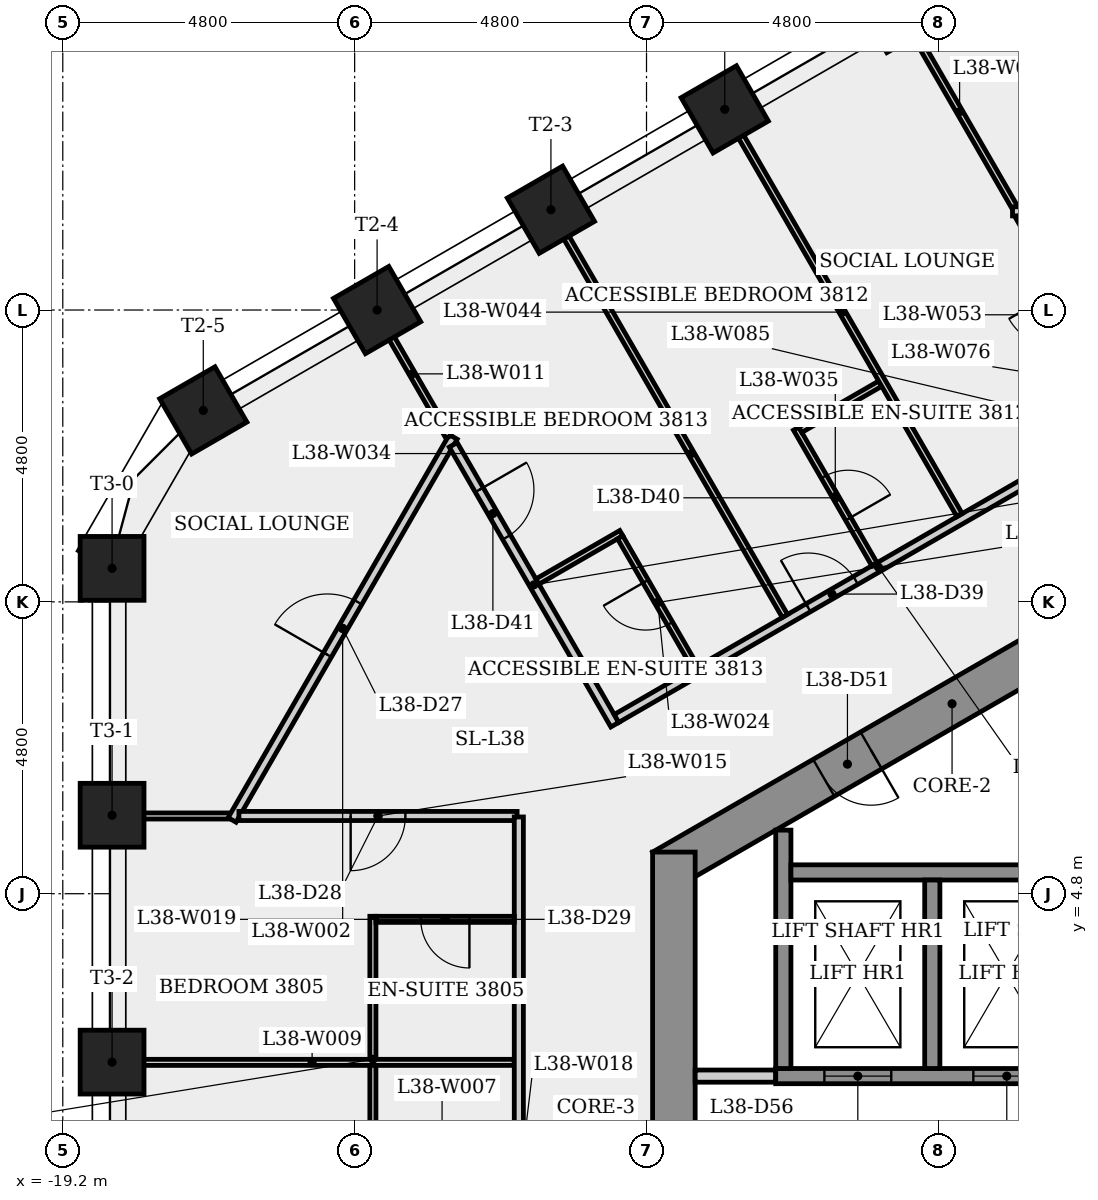
"""IFC4 building model, lengths in metres.
Left out: names, types, materials, properties, quantities, classifications, styles, units other than length and angle.
Written with IfcOpenShell. Run it as: python <this file> out.ifc"""

import sys

from ifc_helpers import new_model, si_unit, direction, frame, frame_2d, origin, origin_2d, place, context, subcontext, project, spatial, rectangle, extrude, element, fill, save


model = new_model("IFC4")
c1 = context("Model", 3, precision=1e-05, world=origin(), true_north=direction((0.0, 1.0)))
c2 = subcontext(c1, "Body", "Model", "MODEL_VIEW")
j1 = project(units=[si_unit("LENGTHUNIT", "METRE"), si_unit("PLANEANGLEUNIT", "RADIAN")], contexts=[c1])
p1 = place(None, origin())
s1 = spatial("IfcSite", under=j1, at=p1, CompositionType="ELEMENT")
p2 = place(p1, origin())
s2 = spatial("IfcBuilding", under=s1, at=p2, CompositionType="ELEMENT")
p3 = place(p2, frame((0.0, 0.0, 143.9)))
s3 = spatial("IfcBuildingStorey", under=s2, at=p3, CompositionType="ELEMENT", Elevation=143.9)
p4 = place(p3, frame((0.175, 10.667, 0.0), z_axis=(0.0, 0.0, 1.0), x_axis=(-0.866023993627, -0.500002442456, 0.0)))
e1 = element("IfcWall", 1, at=p4, inside=s3, PredefinedType="SHEAR", context=c2, shape_type="SweptSolid", body=[
    extrude(rectangle(XDim=10.97, YDim=0.7, at=frame_2d((5.485, 0.0))), origin(), (0.0, 0.0, 1.0), 4.0),
])
p5 = place(p4, frame((7.021, 0.0, 0.0)))
e2 = element("IfcOpeningElement", 2, at=p5, cuts=e1, PredefinedType="OPENING", context=c2, shape_type="SweptSolid", body=[
    extrude(rectangle(XDim=0.9, YDim=2.1, at=frame_2d((0.45, 1.05))), frame((0.0, 0.36, 0.0), z_axis=(0.0, -1.0, 0.0), x_axis=(1.0, 0.0, 0.0)), (0.0, 0.0, 1.0), 0.72),
])
p6 = place(p3, frame((-9.15, 5.485, 0.0), z_axis=(0.0, 0.0, 1.0), x_axis=(0.0, -1.0, 0.0)))
e3 = element("IfcWall", 3, at=p6, inside=s3, PredefinedType="SHEAR", context=c2, shape_type="SweptSolid", body=[
    extrude(rectangle(XDim=10.97, YDim=0.7, at=frame_2d((5.485, 0.0))), origin(), (0.0, 0.0, 1.0), 4.0),
])
p7 = place(p6, frame((4.685, 0.0, 0.0)))
e4 = element("IfcOpeningElement", 4, at=p7, cuts=e3, PredefinedType="OPENING", context=c2, shape_type="SweptSolid", body=[
    extrude(rectangle(XDim=1.6, YDim=2.1, at=frame_2d((0.8, 1.05))), frame((0.0, 0.36, 0.0), z_axis=(0.0, -1.0, 0.0), x_axis=(1.0, 0.0, 0.0)), (0.0, 0.0, 1.0), 0.72),
])
for number, where, z_axis, x_axis in (
    (5, (-5.455, 19.351, 0.0), (0.0, 0.0, 1.0), (-0.5, 0.866, 0.0)),
    (6, (-8.313, 17.7, 0.0), (0.0, 0.0, 1.0), (-0.5, 0.866, 0.0)),
    (7, (-11.172, 16.05, 0.0), (0.0, 0.0, 1.0), (-0.5, 0.866, 0.0)),
    (8, (-14.031, 14.399, 0.0), (0.0, 0.0, 1.0), (-0.5, 0.866, 0.0)),
    (9, (-16.889, 12.749, 0.0), (0.0, 0.0, 1.0), (-0.5, 0.866, 0.0)),
    (10, (-18.389, 10.151, 0.0), (0.0, 0.0, 1.0), (-1.0, 0.0, 0.0)),
    (11, (-18.389, 6.091, 0.0), (0.0, 0.0, 1.0), (-1.0, 0.0, 0.0)),
    (12, (-18.389, 2.03, 0.0), (0.0, 0.0, 1.0), (-1.0, 0.0, 0.0)),
):
    element("IfcColumn", number, at=place(p3, frame(where, z_axis=z_axis, x_axis=x_axis)), inside=s3, PredefinedType="COLUMN", context=c2, shape_type="SweptSolid", body=[
        extrude(rectangle(XDim=1.05, YDim=1.05, at=origin_2d()), origin(), (0.0, 0.0, 1.0), 4.0),
    ])
p8 = place(p3, frame((-16.453, 6.078, 0.0), z_axis=(0.0, 0.0, 1.0), x_axis=(-1.0, 0.0, 0.0)))
e13 = element("IfcWall", 13, at=p8, inside=s3, PredefinedType="PARTITIONING", context=c2, shape_type="SweptSolid", body=[
    extrude(rectangle(XDim=1.971, YDim=0.1, at=frame_2d((0.986, 0.0))), origin(), (0.0, 0.0, 1.0), 3.6),
])
p9 = place(p3, frame((-16.416, 6.013, 0.0), z_axis=(0.0, 0.0, 1.0), x_axis=(0.50001977908, 0.866013984026, 0.0)))
e14 = element("IfcWall", 14, at=p9, inside=s3, PredefinedType="PARTITIONING", context=c2, shape_type="SweptSolid", body=[
    extrude(rectangle(XDim=7.274, YDim=0.15, at=frame_2d((3.637, 0.0))), origin(), (0.0, 0.0, 1.0), 3.6),
])
p10 = place(p9, frame((3.137, 0.0, 0.0)))
e15 = element("IfcOpeningElement", 15, at=p10, cuts=e14, PredefinedType="OPENING", context=c2, shape_type="SweptSolid", body=[
    extrude(rectangle(XDim=1.0, YDim=2.1, at=frame_2d((0.5, 1.05))), frame((0.0, 0.085, 0.0), z_axis=(0.0, -1.0, 0.0), x_axis=(1.0, 0.0, 0.0)), (0.0, 0.0, 1.0), 0.17),
])
p11 = place(p3, frame((-14.1, -0.276, 0.0), z_axis=(0.0, 0.0, 1.0), x_axis=(0.0, 1.0, 0.0)))
e16 = element("IfcWall", 16, at=p11, inside=s3, PredefinedType="PARTITIONING", context=c2, shape_type="SweptSolid", body=[
    extrude(rectangle(XDim=4.705, YDim=0.1, at=frame_2d((2.352, 0.0))), origin(), (0.0, 0.0, 1.0), 3.6),
])
p12 = place(p3, frame((-18.424, 2.026, 0.0), z_axis=(0.0, 0.0, 1.0), x_axis=(1.0, 0.0, 0.0)))
e17 = element("IfcWall", 17, at=p12, inside=s3, PredefinedType="PARTITIONING", context=c2, shape_type="SweptSolid", body=[
    extrude(rectangle(XDim=6.649, YDim=0.1, at=frame_2d((3.325, 0.0))), origin(), (0.0, 0.0, 1.0), 3.6),
])
p13 = place(p3, frame((-14.052, 14.387, 0.0), z_axis=(0.0, 0.0, 1.0), x_axis=(0.499975343382, -0.866039638822, 0.0)))
e18 = element("IfcWall", 18, at=p13, inside=s3, PredefinedType="PARTITIONING", context=c2, shape_type="SweptSolid", body=[
    extrude(rectangle(XDim=2.396, YDim=0.1, at=frame_2d((1.198, 0.0))), origin(), (0.0, 0.0, 1.0), 3.6),
])
p14 = place(p3, frame((-12.779, 12.183, 0.0), z_axis=(0.0, 0.0, 1.0), x_axis=(0.500007419992, -0.866021119808, 0.0)))
e19 = element("IfcWall", 19, at=p14, inside=s3, PredefinedType="PARTITIONING", context=c2, shape_type="SweptSolid", body=[
    extrude(rectangle(XDim=5.315, YDim=0.15, at=frame_2d((2.657, 0.0))), origin(), (0.0, 0.0, 1.0), 3.6),
])
p15 = place(p14, frame((0.855, 0.0, 0.0)))
e20 = element("IfcOpeningElement", 20, at=p15, cuts=e19, PredefinedType="OPENING", context=c2, shape_type="SweptSolid", body=[
    extrude(rectangle(XDim=0.9, YDim=2.1, at=frame_2d((0.45, 1.05))), frame((0.0, 0.085, 0.0), z_axis=(0.0, -1.0, 0.0), x_axis=(1.0, 0.0, 0.0)), (0.0, 0.0, 1.0), 0.17),
])
p16 = place(p3, frame((-11.728, 6.078, 0.0), z_axis=(0.0, 0.0, 1.0), x_axis=(-1.0, 0.0, 0.0)))
e21 = element("IfcWall", 21, at=p16, inside=s3, PredefinedType="PARTITIONING", context=c2, shape_type="SweptSolid", body=[
    extrude(rectangle(XDim=4.575, YDim=0.15, at=frame_2d((2.288, 0.0))), origin(), (0.0, 0.0, 1.0), 3.6),
])
p17 = place(p16, frame((1.838, 0.0, 0.0)))
e22 = element("IfcOpeningElement", 22, at=p17, cuts=e21, PredefinedType="OPENING", context=c2, shape_type="SweptSolid", body=[
    extrude(rectangle(XDim=0.9, YDim=2.1, at=frame_2d((0.45, 1.05))), frame((0.0, 0.085, 0.0), z_axis=(0.0, -1.0, 0.0), x_axis=(1.0, 0.0, 0.0)), (0.0, 0.0, 1.0), 0.17),
])
p18 = place(p3, frame((-11.7, 6.062, 0.0), z_axis=(0.0, 0.0, 1.0), x_axis=(0.0, -1.0, 0.0)))
e23 = element("IfcWall", 23, at=p18, inside=s3, PredefinedType="PARTITIONING", context=c2, shape_type="SweptSolid", body=[
    extrude(rectangle(XDim=12.125, YDim=0.15, at=frame_2d((6.062, 0.0))), origin(), (0.0, 0.0, 1.0), 3.6),
])
p19 = place(p18, frame((6.788, 0.0, 0.0)))
e24 = element("IfcOpeningElement", 24, at=p19, cuts=e23, PredefinedType="OPENING", context=c2, shape_type="SweptSolid", body=[
    extrude(rectangle(XDim=0.9, YDim=2.1, at=frame_2d((0.45, 1.05))), frame((0.0, 0.085, 0.0), z_axis=(0.0, -1.0, 0.0), x_axis=(1.0, 0.0, 0.0)), (0.0, 0.0, 1.0), 0.17),
])
p20 = place(p3, frame((-11.775, 4.378, 0.0), z_axis=(0.0, 0.0, 1.0), x_axis=(-1.0, 0.0, 0.0)))
e25 = element("IfcWall", 25, at=p20, inside=s3, PredefinedType="PARTITIONING", context=c2, shape_type="SweptSolid", body=[
    extrude(rectangle(XDim=2.275, YDim=0.1, at=frame_2d((1.138, 0.0))), origin(), (0.0, 0.0, 1.0), 3.6),
])
p21 = place(p20, frame((0.738, 0.0, 0.0)))
e26 = element("IfcOpeningElement", 26, at=p21, cuts=e25, PredefinedType="OPENING", context=c2, shape_type="SweptSolid", body=[
    extrude(rectangle(XDim=0.8, YDim=2.1, at=frame_2d((0.4, 1.05))), frame((0.0, 0.06, 0.0), z_axis=(0.0, -1.0, 0.0), x_axis=(1.0, 0.0, 0.0)), (0.0, 0.0, 1.0), 0.12),
])
p22 = place(p3, frame((-10.094, 7.682, 0.0), z_axis=(0.0, 0.0, 1.0), x_axis=(0.866024204941, 0.500002076452, 0.0)))
e27 = element("IfcWall", 27, at=p22, inside=s3, PredefinedType="PARTITIONING", context=c2, shape_type="SweptSolid", body=[
    extrude(rectangle(XDim=9.951, YDim=0.15, at=frame_2d((4.976, 0.0))), origin(), (0.0, 0.0, 1.0), 3.6),
])
p23 = place(p22, frame((3.642, 0.0, 0.0)))
e28 = element("IfcOpeningElement", 28, at=p23, cuts=e27, PredefinedType="OPENING", context=c2, shape_type="SweptSolid", body=[
    extrude(rectangle(XDim=0.9, YDim=2.1, at=frame_2d((0.45, 1.05))), frame((0.0, 0.085, 0.0), z_axis=(0.0, -1.0, 0.0), x_axis=(1.0, 0.0, 0.0)), (0.0, 0.0, 1.0), 0.17),
])
p24 = place(p3, frame((-10.015, 10.73, 0.0), z_axis=(0.0, 0.0, 1.0), x_axis=(-0.866017059223, -0.500014452926, 0.0)))
e29 = element("IfcWall", 29, at=p24, inside=s3, PredefinedType="PARTITIONING", context=c2, shape_type="SweptSolid", body=[
    extrude(rectangle(XDim=1.592, YDim=0.1, at=frame_2d((0.796, 0.0))), origin(), (0.0, 0.0, 1.0), 3.6),
])
p25 = place(p3, frame((-8.8, 1.8, 0.0), z_axis=(0.0, 0.0, 1.0), x_axis=(1.0, 0.0, 0.0)))
e30 = element("IfcWall", 30, at=p25, inside=s3, PredefinedType="PARTITIONING", context=c2, shape_type="SweptSolid", body=[
    extrude(rectangle(XDim=1.325, YDim=0.2, at=frame_2d((0.663, 0.0))), origin(), (0.0, 0.0, 1.0), 3.6),
])
p26 = place(p3, frame((-8.796, 8.518, 0.0), z_axis=(0.0, 0.0, 1.0), x_axis=(-0.500032699561, 0.866006523861, 0.0)))
e31 = element("IfcWall", 31, at=p26, inside=s3, PredefinedType="PARTITIONING", context=c2, shape_type="SweptSolid", body=[
    extrude(rectangle(XDim=2.475, YDim=0.1, at=frame_2d((1.237, 0.0))), origin(), (0.0, 0.0, 1.0), 3.6),
])
p27 = place(p26, frame((0.837, 0.0, 0.0)))
e32 = element("IfcOpeningElement", 32, at=p27, cuts=e31, PredefinedType="OPENING", context=c2, shape_type="SweptSolid", body=[
    extrude(rectangle(XDim=0.8, YDim=2.1, at=frame_2d((0.4, 1.05))), frame((0.0, 0.06, 0.0), z_axis=(0.0, -1.0, 0.0), x_axis=(1.0, 0.0, 0.0)), (0.0, 0.0, 1.0), 0.12),
])
p28 = place(p3, frame((-7.475, 1.8, 0.0), z_axis=(0.0, 0.0, 1.0), x_axis=(1.0, 0.0, 0.0)))
e33 = element("IfcWall", 33, at=p28, inside=s3, PredefinedType="SHEAR", context=c2, shape_type="SweptSolid", body=[
    extrude(rectangle(XDim=14.95, YDim=0.25, at=frame_2d((7.475, 0.0))), origin(), (0.0, 0.0, 1.0), 3.6),
])
p29 = place(p28, frame((0.8, 0.0, 0.0)))
e34 = element("IfcOpeningElement", 34, at=p29, cuts=e33, PredefinedType="OPENING", context=c2, shape_type="SweptSolid", body=[
    extrude(rectangle(XDim=1.1, YDim=2.1, at=frame_2d((0.55, 1.05))), frame((0.0, 0.135, 0.0), z_axis=(0.0, -1.0, 0.0), x_axis=(1.0, 0.0, 0.0)), (0.0, 0.0, 1.0), 0.27),
])
p30 = place(p28, frame((3.25, 0.0, 0.0)))
e35 = element("IfcOpeningElement", 35, at=p30, cuts=e33, PredefinedType="OPENING", context=c2, shape_type="SweptSolid", body=[
    extrude(rectangle(XDim=1.1, YDim=2.1, at=frame_2d((0.55, 1.05))), frame((0.0, 0.135, 0.0), z_axis=(0.0, -1.0, 0.0), x_axis=(1.0, 0.0, 0.0)), (0.0, 0.0, 1.0), 0.27),
])
p31 = place(p28, frame((5.7, 0.0, 0.0)))
e36 = element("IfcOpeningElement", 36, at=p31, cuts=e33, PredefinedType="OPENING", context=c2, shape_type="SweptSolid", body=[
    extrude(rectangle(XDim=1.1, YDim=2.1, at=frame_2d((0.55, 1.05))), frame((0.0, 0.135, 0.0), z_axis=(0.0, -1.0, 0.0), x_axis=(1.0, 0.0, 0.0)), (0.0, 0.0, 1.0), 0.27),
])
p32 = place(p28, frame((8.15, 0.0, 0.0)))
e37 = element("IfcOpeningElement", 37, at=p32, cuts=e33, PredefinedType="OPENING", context=c2, shape_type="SweptSolid", body=[
    extrude(rectangle(XDim=1.1, YDim=2.1, at=frame_2d((0.55, 1.05))), frame((0.0, 0.135, 0.0), z_axis=(0.0, -1.0, 0.0), x_axis=(1.0, 0.0, 0.0)), (0.0, 0.0, 1.0), 0.27),
])
p33 = place(p28, frame((10.6, 0.0, 0.0)))
e38 = element("IfcOpeningElement", 38, at=p33, cuts=e33, PredefinedType="OPENING", context=c2, shape_type="SweptSolid", body=[
    extrude(rectangle(XDim=1.1, YDim=2.1, at=frame_2d((0.55, 1.05))), frame((0.0, 0.135, 0.0), z_axis=(0.0, -1.0, 0.0), x_axis=(1.0, 0.0, 0.0)), (0.0, 0.0, 1.0), 0.27),
])
p34 = place(p28, frame((13.05, 0.0, 0.0)))
e39 = element("IfcOpeningElement", 39, at=p34, cuts=e33, PredefinedType="OPENING", context=c2, shape_type="SweptSolid", body=[
    extrude(rectangle(XDim=1.1, YDim=2.1, at=frame_2d((0.55, 1.05))), frame((0.0, 0.135, 0.0), z_axis=(0.0, -1.0, 0.0), x_axis=(1.0, 0.0, 0.0)), (0.0, 0.0, 1.0), 0.27),
])
p35 = place(p3, frame((-7.35, 1.925, 0.0), z_axis=(0.0, 0.0, 1.0), x_axis=(0.0, 1.0, 0.0)))
e40 = element("IfcWall", 40, at=p35, inside=s3, PredefinedType="SHEAR", context=c2, shape_type="SweptSolid", body=[
    extrude(rectangle(XDim=3.921, YDim=0.25, at=frame_2d((1.96, 0.0))), origin(), (0.0, 0.0, 1.0), 3.6),
])
p36 = place(p3, frame((-7.225, 5.15, 0.0), z_axis=(0.0, 0.0, 1.0), x_axis=(1.0, 0.0, 0.0)))
e41 = element("IfcWall", 41, at=p36, inside=s3, PredefinedType="SHEAR", context=c2, shape_type="SweptSolid", body=[
    extrude(rectangle(XDim=14.7, YDim=0.25, at=frame_2d((7.35, 0.0))), origin(), (0.0, 0.0, 1.0), 3.6),
])
p37 = place(p3, frame((-7.324, 9.368, 0.0), z_axis=(0.0, 0.0, 1.0), x_axis=(-0.500021201058, 0.866013163002, 0.0)))
e42 = element("IfcWall", 42, at=p37, inside=s3, PredefinedType="PARTITIONING", context=c2, shape_type="SweptSolid", body=[
    extrude(rectangle(XDim=7.711, YDim=0.1, at=frame_2d((3.855, 0.0))), origin(), (0.0, 0.0, 1.0), 3.6),
])
p38 = place(p3, frame((-7.139, 12.448, 0.0), z_axis=(0.0, 0.0, 1.0), x_axis=(0.500034319456, -0.866005588531, 0.0)))
e43 = element("IfcWall", 43, at=p38, inside=s3, PredefinedType="PARTITIONING", context=c2, shape_type="SweptSolid", body=[
    extrude(rectangle(XDim=2.575, YDim=0.1, at=frame_2d((1.288, 0.0))), origin(), (0.0, 0.0, 1.0), 3.6),
])
p39 = place(p38, frame((0.913, 0.0, 0.0)))
e44 = element("IfcOpeningElement", 44, at=p39, cuts=e43, PredefinedType="OPENING", context=c2, shape_type="SweptSolid", body=[
    extrude(rectangle(XDim=0.8, YDim=2.1, at=frame_2d((0.4, 1.05))), frame((0.0, 0.06, 0.0), z_axis=(0.0, -1.0, 0.0), x_axis=(1.0, 0.0, 0.0)), (0.0, 0.0, 1.0), 0.12),
])
p40 = place(p3, frame((-5.757, 13.188, 0.0), z_axis=(0.0, 0.0, 1.0), x_axis=(-0.866006015803, -0.500033579465, 0.0)))
e45 = element("IfcWall", 45, at=p40, inside=s3, PredefinedType="PARTITIONING", context=c2, shape_type="SweptSolid", body=[
    extrude(rectangle(XDim=1.517, YDim=0.1, at=frame_2d((0.759, 0.0))), origin(), (0.0, 0.0, 1.0), 3.6),
])
p41 = place(p3, frame((-5.359, 19.233, 0.0), z_axis=(0.0, 0.0, 1.0), x_axis=(0.499978511878, -0.866037809602, 0.0)))
e46 = element("IfcWall", 46, at=p41, inside=s3, PredefinedType="PARTITIONING", context=c2, shape_type="SweptSolid", body=[
    extrude(rectangle(XDim=3.632, YDim=0.1, at=frame_2d((1.816, 0.0))), origin(), (0.0, 0.0, 1.0), 3.6),
])
p42 = place(p3, frame((-4.9, 5.025, 0.0), z_axis=(0.0, 0.0, 1.0), x_axis=(0.0, -1.0, 0.0)))
e47 = element("IfcWall", 47, at=p42, inside=s3, PredefinedType="SHEAR", context=c2, shape_type="SweptSolid", body=[
    extrude(rectangle(XDim=3.1, YDim=0.25, at=frame_2d((1.55, 0.0))), origin(), (0.0, 0.0, 1.0), 4.0),
])
p43 = place(p3, frame((-4.451, 11.027, 0.0), z_axis=(0.0, 0.0, 1.0), x_axis=(-0.499983743644, 0.866034789193, 0.0)))
e48 = element("IfcWall", 48, at=p43, inside=s3, PredefinedType="PARTITIONING", context=c2, shape_type="SweptSolid", body=[
    extrude(rectangle(XDim=7.711, YDim=0.1, at=frame_2d((3.855, 0.0))), origin(), (0.0, 0.0, 1.0), 3.6),
])
p44 = place(p3, frame((-4.951, 26.117, 0.0), z_axis=(0.0, 0.0, 1.0), x_axis=(0.866023342268, -0.500003570635, 0.0)))
e49 = element("IfcWall", 49, at=p44, inside=s3, PredefinedType="PARTITIONING", context=c2, shape_type="SweptSolid", body=[
    extrude(rectangle(XDim=25.385, YDim=0.1, at=frame_2d((12.692, 0.0))), origin(), (0.0, 0.0, 1.0), 3.6),
])
p45 = place(p3, frame((-3.581, 16.023, 0.0), z_axis=(0.0, 0.0, 1.0), x_axis=(1.0, 0.0, 0.0)))
e50 = element("IfcWall", 50, at=p45, inside=s3, PredefinedType="PARTITIONING", context=c2, shape_type="SweptSolid", body=[
    extrude(rectangle(XDim=4.393, YDim=0.15, at=frame_2d((2.196, 0.0))), origin(), (0.0, 0.0, 1.0), 3.6),
])
p46 = place(p3, frame((-1.579, 12.685, 0.0), z_axis=(0.0, 0.0, 1.0), x_axis=(-0.500002049001, 0.86602422079, 0.0)))
e51 = element("IfcWall", 51, at=p46, inside=s3, PredefinedType="PARTITIONING", context=c2, shape_type="SweptSolid", body=[
    extrude(rectangle(XDim=3.779, YDim=0.15, at=frame_2d((1.89, 0.0))), origin(), (0.0, 0.0, 1.0), 3.6),
])
p47 = place(p46, frame((1.39, 0.0, 0.0)))
e52 = element("IfcOpeningElement", 52, at=p47, cuts=e51, PredefinedType="OPENING", context=c2, shape_type="SweptSolid", body=[
    extrude(rectangle(XDim=1.0, YDim=2.1, at=frame_2d((0.5, 1.05))), frame((0.0, 0.085, 0.0), z_axis=(0.0, -1.0, 0.0), x_axis=(1.0, 0.0, 0.0)), (0.0, 0.0, 1.0), 0.17),
])
p48 = place(p29, origin())
e53 = element("IfcDoor", 53, at=p48, inside=s3, OperationType="SLIDING_TO_LEFT", PredefinedType="DOOR", context=c2, shape_type="SweptSolid", body=[
    extrude(rectangle(XDim=1.1, YDim=2.1, at=frame_2d((0.55, 1.05))), frame((0.0, 0.025, 0.0), z_axis=(0.0, -1.0, 0.0), x_axis=(1.0, 0.0, 0.0)), (0.0, 0.0, 1.0), 0.05),
])
fill(e34, e53)
p49 = place(p30, origin())
e54 = element("IfcDoor", 54, at=p49, inside=s3, OperationType="SLIDING_TO_LEFT", PredefinedType="DOOR", context=c2, shape_type="SweptSolid", body=[
    extrude(rectangle(XDim=1.1, YDim=2.1, at=frame_2d((0.55, 1.05))), frame((0.0, 0.025, 0.0), z_axis=(0.0, -1.0, 0.0), x_axis=(1.0, 0.0, 0.0)), (0.0, 0.0, 1.0), 0.05),
])
fill(e35, e54)
p50 = place(p10, origin())
e55 = element("IfcDoor", 55, at=p50, inside=s3, OperationType="SINGLE_SWING_LEFT", PredefinedType="DOOR", context=c2, shape_type="SweptSolid", body=[
    extrude(rectangle(XDim=1.0, YDim=2.1, at=frame_2d((0.5, 1.05))), frame((0.0, 0.025, 0.0), z_axis=(0.0, -1.0, 0.0), x_axis=(1.0, 0.0, 0.0)), (0.0, 0.0, 1.0), 0.05),
])
fill(e15, e55)
p51 = place(p17, origin())
e56 = element("IfcDoor", 56, at=p51, inside=s3, OperationType="SINGLE_SWING_RIGHT", PredefinedType="DOOR", context=c2, shape_type="SweptSolid", body=[
    extrude(rectangle(XDim=0.9, YDim=2.1, at=frame_2d((0.45, 1.05))), frame((0.0, 0.025, 0.0), z_axis=(0.0, -1.0, 0.0), x_axis=(1.0, 0.0, 0.0)), (0.0, 0.0, 1.0), 0.05),
])
fill(e22, e56)
p52 = place(p21, origin())
e57 = element("IfcDoor", 57, at=p52, inside=s3, OperationType="SINGLE_SWING_LEFT", PredefinedType="DOOR", context=c2, shape_type="SweptSolid", body=[
    extrude(rectangle(XDim=0.8, YDim=2.1, at=frame_2d((0.4, 1.05))), frame((0.0, 0.025, 0.0), z_axis=(0.0, -1.0, 0.0), x_axis=(1.0, 0.0, 0.0)), (0.0, 0.0, 1.0), 0.05),
])
fill(e26, e57)
p53 = place(p23, origin())
e58 = element("IfcDoor", 58, at=p53, inside=s3, OperationType="SINGLE_SWING_LEFT", PredefinedType="DOOR", context=c2, shape_type="SweptSolid", body=[
    extrude(rectangle(XDim=0.9, YDim=2.1, at=frame_2d((0.45, 1.05))), frame((0.0, 0.025, 0.0), z_axis=(0.0, -1.0, 0.0), x_axis=(1.0, 0.0, 0.0)), (0.0, 0.0, 1.0), 0.05),
])
fill(e28, e58)
p54 = place(p39, origin())
e59 = element("IfcDoor", 59, at=p54, inside=s3, OperationType="SINGLE_SWING_RIGHT", PredefinedType="DOOR", context=c2, shape_type="SweptSolid", body=[
    extrude(rectangle(XDim=0.8, YDim=2.1, at=frame_2d((0.4, 1.05))), frame((0.0, 0.025, 0.0), z_axis=(0.0, -1.0, 0.0), x_axis=(1.0, 0.0, 0.0)), (0.0, 0.0, 1.0), 0.05),
])
fill(e44, e59)
p55 = place(p15, origin())
e60 = element("IfcDoor", 60, at=p55, inside=s3, OperationType="SINGLE_SWING_LEFT", PredefinedType="DOOR", context=c2, shape_type="SweptSolid", body=[
    extrude(rectangle(XDim=0.9, YDim=2.1, at=frame_2d((0.45, 1.05))), frame((0.0, 0.025, 0.0), z_axis=(0.0, -1.0, 0.0), x_axis=(1.0, 0.0, 0.0)), (0.0, 0.0, 1.0), 0.05),
])
fill(e20, e60)
p56 = place(p27, origin())
e61 = element("IfcDoor", 61, at=p56, inside=s3, OperationType="SINGLE_SWING_RIGHT", PredefinedType="DOOR", context=c2, shape_type="SweptSolid", body=[
    extrude(rectangle(XDim=0.8, YDim=2.1, at=frame_2d((0.4, 1.05))), frame((0.0, 0.025, 0.0), z_axis=(0.0, -1.0, 0.0), x_axis=(1.0, 0.0, 0.0)), (0.0, 0.0, 1.0), 0.05),
])
fill(e32, e61)
p57 = place(p5, origin())
e62 = element("IfcDoor", 62, at=p57, inside=s3, OperationType="SINGLE_SWING_LEFT", PredefinedType="DOOR", context=c2, shape_type="SweptSolid", body=[
    extrude(rectangle(XDim=0.9, YDim=2.1, at=frame_2d((0.45, 1.05))), frame((0.0, 0.025, 0.0), z_axis=(0.0, -1.0, 0.0), x_axis=(1.0, 0.0, 0.0)), (0.0, 0.0, 1.0), 0.05),
])
fill(e2, e62)
save(model, sys.argv[1])
